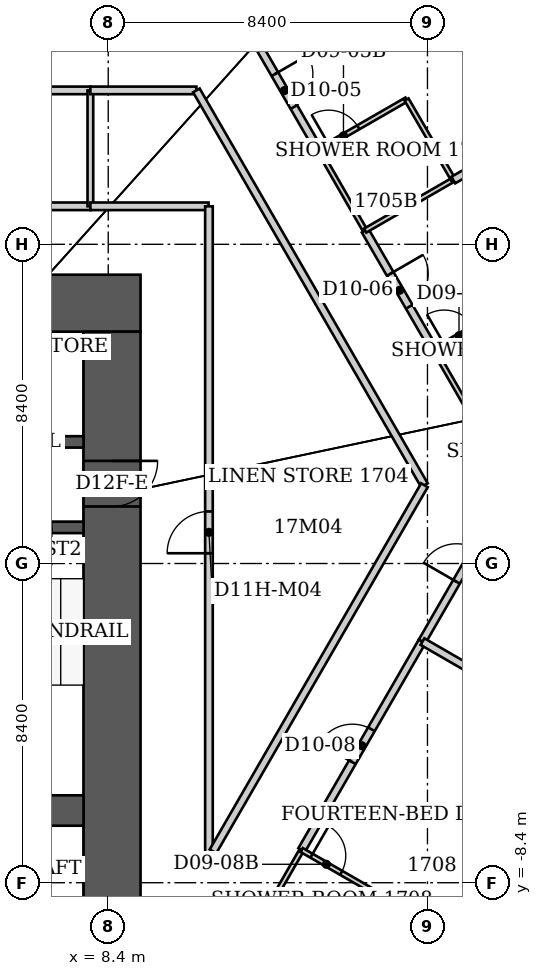
"""IFC4 building model, lengths in metres.
Left out: names, types, materials, properties, quantities, classifications, styles, units other than length and angle.
Written with IfcOpenShell. Run it as: python <this file> out.ifc"""

import sys

from ifc_helpers import new_model, si_unit, direction, frame, frame_2d, origin, place, context, subcontext, project, spatial, rectangle, extrude, element, fill, save


model = new_model("IFC4")
c1 = context("Model", 3, precision=1e-05, world=origin(), true_north=direction((0.0, 1.0)))
c2 = subcontext(c1, "Body", "Model", "MODEL_VIEW")
j1 = project(units=[si_unit("LENGTHUNIT", "METRE"), si_unit("PLANEANGLEUNIT", "RADIAN")], contexts=[c1])
p1 = place(None, origin())
s1 = spatial("IfcSite", under=j1, at=p1, CompositionType="ELEMENT")
p2 = place(p1, origin())
s2 = spatial("IfcBuilding", under=s1, at=p2, CompositionType="ELEMENT")
p3 = place(p2, frame((0.0, 0.0, 72.4)))
s3 = spatial("IfcBuildingStorey", under=s2, at=p3, CompositionType="ELEMENT", Elevation=72.4)
p4 = place(p3, frame((-9.25, 6.85, 0.0), z_axis=(0.0, 0.0, 1.0), x_axis=(1.0, 0.0, 0.0)))
e1 = element("IfcWall", 1, at=p4, inside=s3, PredefinedType="SHEAR", context=c2, shape_type="SweptSolid", body=[
    extrude(rectangle(XDim=18.5, YDim=1.5, at=frame_2d((9.25, 0.0))), origin(), (0.0, 0.0, 1.0), 3.8),
])
p5 = place(p3, frame((8.5, -9.2, 0.0), z_axis=(0.0, 0.0, 1.0), x_axis=(0.0, 1.0, 0.0)))
e2 = element("IfcWall", 2, at=p5, inside=s3, PredefinedType="SHEAR", context=c2, shape_type="SweptSolid", body=[
    extrude(rectangle(XDim=15.3, YDim=1.5, at=frame_2d((7.65, 0.0))), origin(), (0.0, 0.0, 1.0), 3.8),
])
p6 = place(p5, frame((10.7, 0.0, 0.0)))
e3 = element("IfcOpeningElement", 3, at=p6, cuts=e2, PredefinedType="OPENING", context=c2, shape_type="SweptSolid", body=[
    extrude(rectangle(XDim=1.2, YDim=2.2, at=frame_2d((0.6, 1.1))), frame((0.0, 0.75, 0.0), z_axis=(0.0, -1.0, 0.0), x_axis=(1.0, 0.0, 0.0)), (0.0, 0.0, 1.0), 1.5),
])
p7 = place(p3, frame((-7.75, -6.5, 0.0), z_axis=(0.0, 0.0, 1.0), x_axis=(1.0, 0.0, 0.0)))
e4 = element("IfcWall", 4, at=p7, inside=s3, PredefinedType="SHEAR", context=c2, shape_type="SweptSolid", body=[
    extrude(rectangle(XDim=15.5, YDim=0.8, at=frame_2d((7.75, 0.0))), origin(), (0.0, 0.0, 1.0), 3.8),
])
p8 = place(p3, frame((4.75, 0.95, 0.0), z_axis=(0.0, 0.0, 1.0), x_axis=(1.0, 0.0, 0.0)))
e5 = element("IfcWall", 5, at=p8, inside=s3, PredefinedType="SHEAR", context=c2, shape_type="SweptSolid", body=[
    extrude(rectangle(XDim=3.0, YDim=0.3, at=frame_2d((1.5, 0.0))), origin(), (0.0, 0.0, 1.0), 3.8),
])
p9 = place(p8, frame((1.15, 0.0, 0.0)))
e6 = element("IfcOpeningElement", 6, at=p9, cuts=e5, PredefinedType="OPENING", context=c2, shape_type="SweptSolid", body=[
    extrude(rectangle(XDim=1.0, YDim=2.2, at=frame_2d((0.5, 1.1))), frame((0.0, 0.15, 0.0), z_axis=(0.0, -1.0, 0.0), x_axis=(1.0, 0.0, 0.0)), (0.0, 0.0, 1.0), 0.3),
])
p10 = place(p3, frame((-7.75, 3.2, 0.0), z_axis=(0.0, 0.0, 1.0), x_axis=(1.0, 0.0, 0.0)))
e7 = element("IfcWall", 7, at=p10, inside=s3, PredefinedType="SHEAR", context=c2, shape_type="SweptSolid", body=[
    extrude(rectangle(XDim=15.5, YDim=0.3, at=frame_2d((7.75, 0.0))), origin(), (0.0, 0.0, 1.0), 3.8),
])
p11 = place(p10, frame((5.887, 0.0, 0.0)))
e8 = element("IfcOpeningElement", 8, at=p11, cuts=e7, PredefinedType="OPENING", context=c2, shape_type="SweptSolid", body=[
    extrude(rectangle(XDim=1.1, YDim=2.2, at=frame_2d((0.55, 1.1))), frame((0.0, 0.15, 0.0), z_axis=(0.0, -1.0, 0.0), x_axis=(1.0, 0.0, 0.0)), (0.0, 0.0, 1.0), 0.3),
])
p12 = place(p10, frame((9.194, 0.0, 0.0)))
e9 = element("IfcOpeningElement", 9, at=p12, cuts=e7, PredefinedType="OPENING", context=c2, shape_type="SweptSolid", body=[
    extrude(rectangle(XDim=1.1, YDim=2.2, at=frame_2d((0.55, 1.1))), frame((0.0, 0.15, 0.0), z_axis=(0.0, -1.0, 0.0), x_axis=(1.0, 0.0, 0.0)), (0.0, 0.0, 1.0), 0.3),
])
p13 = place(p10, frame((13.081, 0.0, 0.0)))
e10 = element("IfcOpeningElement", 10, at=p13, cuts=e7, PredefinedType="OPENING", context=c2, shape_type="SweptSolid", body=[
    extrude(rectangle(XDim=1.1, YDim=2.2, at=frame_2d((0.55, 1.1))), frame((0.0, 0.15, 0.0), z_axis=(0.0, -1.0, 0.0), x_axis=(1.0, 0.0, 0.0)), (0.0, 0.0, 1.0), 0.3),
])
p14 = place(p3, frame((-0.87, 12.45, 0.0), z_axis=(0.0, 0.0, 1.0), x_axis=(1.0, 0.0, 0.0)))
e11 = element("IfcWall", 11, at=p14, inside=s3, PredefinedType="PARTITIONING", context=c2, shape_type="SweptSolid", body=[
    extrude(rectangle(XDim=8.8, YDim=0.2, at=frame_2d((4.4, 0.0))), origin(), (0.0, 0.0, 1.0), 3.64),
])
p15 = place(p14, frame((3.85, 0.0, 0.0)))
e12 = element("IfcOpeningElement", 12, at=p15, cuts=e11, PredefinedType="OPENING", context=c2, shape_type="SweptSolid", body=[
    extrude(rectangle(XDim=1.1, YDim=2.2, at=frame_2d((0.55, 1.1))), frame((0.0, 0.1, 0.0), z_axis=(0.0, -1.0, 0.0), x_axis=(1.0, 0.0, 0.0)), (0.0, 0.0, 1.0), 0.2),
])
p16 = place(p3, frame((7.93, 9.4, 0.0), z_axis=(0.0, 0.0, 1.0), x_axis=(-1.0, 0.0, 0.0)))
e13 = element("IfcWall", 13, at=p16, inside=s3, PredefinedType="PARTITIONING", context=c2, shape_type="SweptSolid", body=[
    extrude(rectangle(XDim=8.8, YDim=0.2, at=frame_2d((4.4, 0.0))), origin(), (0.0, 0.0, 1.0), 3.64),
])
p17 = place(p3, frame((7.93, 12.45, 0.0), z_axis=(0.0, 0.0, 1.0), x_axis=(0.0, -1.0, 0.0)))
e14 = element("IfcWall", 14, at=p17, inside=s3, PredefinedType="PARTITIONING", context=c2, shape_type="SweptSolid", body=[
    extrude(rectangle(XDim=3.05, YDim=0.15, at=frame_2d((1.525, 0.0))), origin(), (0.0, 0.0, 1.0), 3.64),
])
p18 = place(p3, frame((7.93, 12.45, 0.0), z_axis=(0.0, 0.0, 1.0), x_axis=(1.0, 0.0, 0.0)))
e15 = element("IfcWall", 15, at=p18, inside=s3, PredefinedType="PARTITIONING", context=c2, shape_type="SweptSolid", body=[
    extrude(rectangle(XDim=2.79, YDim=0.2, at=frame_2d((1.395, 0.0))), origin(), (0.0, 0.0, 1.0), 3.64),
])
p19 = place(p3, frame((10.72, 12.45, 0.0), z_axis=(0.0, 0.0, 1.0), x_axis=(0.500087057827, -0.86597513509, 0.0)))
e16 = element("IfcWall", 16, at=p19, inside=s3, PredefinedType="PARTITIONING", context=c2, shape_type="SweptSolid", body=[
    extrude(rectangle(XDim=11.998, YDim=0.2, at=frame_2d((5.999, 0.0))), origin(), (0.0, 0.0, 1.0), 3.64),
])
p20 = place(p3, frame((11.04, 9.4, 0.0), z_axis=(0.0, 0.0, 1.0), x_axis=(-1.0, 0.0, 0.0)))
e17 = element("IfcWall", 17, at=p20, inside=s3, PredefinedType="PARTITIONING", context=c2, shape_type="SweptSolid", body=[
    extrude(rectangle(XDim=3.11, YDim=0.2, at=frame_2d((1.555, 0.0))), origin(), (0.0, 0.0, 1.0), 3.64),
])
p21 = place(p3, frame((11.05, -7.76, 0.0), z_axis=(0.0, 0.0, 1.0), x_axis=(0.0, 1.0, 0.0)))
e18 = element("IfcWall", 18, at=p21, inside=s3, PredefinedType="PARTITIONING", context=c2, shape_type="SweptSolid", body=[
    extrude(rectangle(XDim=17.16, YDim=0.2, at=frame_2d((8.58, 0.0))), origin(), (0.0, 0.0, 1.0), 3.64),
])
p22 = place(p21, frame((8.03, 0.0, 0.0)))
e19 = element("IfcOpeningElement", 19, at=p22, cuts=e18, PredefinedType="OPENING", context=c2, shape_type="SweptSolid", body=[
    extrude(rectangle(XDim=1.1, YDim=2.2, at=frame_2d((0.55, 1.1))), frame((0.0, 0.1, 0.0), z_axis=(0.0, -1.0, 0.0), x_axis=(1.0, 0.0, 0.0)), (0.0, 0.0, 1.0), 0.2),
])
p23 = place(p3, frame((12.13, 14.01, 0.0), z_axis=(0.0, 0.0, 1.0), x_axis=(0.500597042564, -0.865680426587, 0.0)))
e20 = element("IfcWall", 20, at=p23, inside=s3, PredefinedType="PARTITIONING", context=c2, shape_type="SweptSolid", body=[
    extrude(rectangle(XDim=3.616, YDim=0.2, at=frame_2d((1.808, 0.0))), origin(), (0.0, 0.0, 1.0), 3.64),
])
p24 = place(p23, frame((1.308, 0.0, 0.0)))
e21 = element("IfcOpeningElement", 21, at=p24, cuts=e20, PredefinedType="OPENING", context=c2, shape_type="SweptSolid", body=[
    extrude(rectangle(XDim=1.0, YDim=2.13, at=frame_2d((0.5, 1.065))), frame((0.0, 0.1, 0.0), z_axis=(0.0, -1.0, 0.0), x_axis=(1.0, 0.0, 0.0)), (0.0, 0.0, 1.0), 0.2),
])
p25 = place(p3, frame((12.29, -9.62, 0.0), z_axis=(0.0, 0.0, 1.0), x_axis=(0.499693115345, 0.866202511239, 0.0)))
e22 = element("IfcWall", 22, at=p25, inside=s3, PredefinedType="PARTITIONING", context=c2, shape_type="SweptSolid", body=[
    extrude(rectangle(XDim=2.401, YDim=0.12, at=frame_2d((1.201, 0.0))), origin(), (0.0, 0.0, 1.0), 3.64),
])
p26 = place(p3, frame((13.49, -7.54, 0.0), z_axis=(0.0, 0.0, 1.0), x_axis=(0.500032479136, 0.866006651134, 0.0)))
e23 = element("IfcWall", 23, at=p26, inside=s3, PredefinedType="PARTITIONING", context=c2, shape_type="SweptSolid", body=[
    extrude(rectangle(XDim=6.339, YDim=0.2, at=frame_2d((3.17, 0.0))), origin(), (0.0, 0.0, 1.0), 3.64),
])
p27 = place(p26, frame((2.67, 0.0, 0.0)))
e24 = element("IfcOpeningElement", 24, at=p27, cuts=e23, PredefinedType="OPENING", context=c2, shape_type="SweptSolid", body=[
    extrude(rectangle(XDim=1.0, YDim=2.13, at=frame_2d((0.5, 1.065))), frame((0.0, 0.1, 0.0), z_axis=(0.0, -1.0, 0.0), x_axis=(1.0, 0.0, 0.0)), (0.0, 0.0, 1.0), 0.2),
])
p28 = place(p3, frame((13.94, 10.88, 0.0), z_axis=(0.0, 0.0, 1.0), x_axis=(0.498791783817, -0.866721844883, 0.0)))
e25 = element("IfcWall", 25, at=p28, inside=s3, PredefinedType="PARTITIONING", context=c2, shape_type="SweptSolid", body=[
    extrude(rectangle(XDim=2.446, YDim=0.12, at=frame_2d((1.223, 0.0))), origin(), (0.0, 0.0, 1.0), 3.64),
])
p29 = place(p3, frame((15.16, 8.76, 0.0), z_axis=(0.0, 0.0, 1.0), x_axis=(0.500948763063, -0.865476941799, 0.0)))
e26 = element("IfcWall", 26, at=p29, inside=s3, PredefinedType="PARTITIONING", context=c2, shape_type="SweptSolid", body=[
    extrude(rectangle(XDim=3.629, YDim=0.2, at=frame_2d((1.815, 0.0))), origin(), (0.0, 0.0, 1.0), 3.64),
])
p30 = place(p29, frame((1.315, 0.0, 0.0)))
e27 = element("IfcOpeningElement", 27, at=p30, cuts=e26, PredefinedType="OPENING", context=c2, shape_type="SweptSolid", body=[
    extrude(rectangle(XDim=1.0, YDim=2.13, at=frame_2d((0.5, 1.065))), frame((0.0, 0.1, 0.0), z_axis=(0.0, -1.0, 0.0), x_axis=(1.0, 0.0, 0.0)), (0.0, 0.0, 1.0), 0.2),
])
p31 = place(p3, frame((15.16, 8.76, 0.0), z_axis=(0.0, 0.0, 1.0), x_axis=(0.865929097586, 0.500166770141, 0.0)))
e28 = element("IfcWall", 28, at=p31, inside=s3, PredefinedType="PARTITIONING", context=c2, shape_type="SweptSolid", body=[
    extrude(rectangle(XDim=2.679, YDim=0.12, at=frame_2d((1.34, 0.0))), origin(), (0.0, 0.0, 1.0), 2.86),
])
p32 = place(p3, frame((15.76, -8.85, 0.0), z_axis=(0.0, 0.0, 1.0), x_axis=(-0.866114241029, 0.499846097802, 0.0)))
e29 = element("IfcWall", 29, at=p32, inside=s3, PredefinedType="PARTITIONING", context=c2, shape_type="SweptSolid", body=[
    extrude(rectangle(XDim=2.621, YDim=0.12, at=frame_2d((1.311, 0.0))), origin(), (0.0, 0.0, 1.0), 3.64),
])
p33 = place(p32, frame((1.421, 0.0, 0.0)))
e30 = element("IfcOpeningElement", 30, at=p33, cuts=e29, PredefinedType="OPENING", context=c2, shape_type="SweptSolid", body=[
    extrude(rectangle(XDim=0.9, YDim=2.03, at=frame_2d((0.45, 1.015))), frame((0.0, 0.06, 0.0), z_axis=(0.0, -1.0, 0.0), x_axis=(1.0, 0.0, 0.0)), (0.0, 0.0, 1.0), 0.12),
])
p34 = place(p3, frame((16.25, 12.21, 0.0), z_axis=(0.0, 0.0, 1.0), x_axis=(-0.866654860089, -0.498908161372, 0.0)))
e31 = element("IfcWall", 31, at=p34, inside=s3, PredefinedType="PARTITIONING", context=c2, shape_type="SweptSolid", body=[
    extrude(rectangle(XDim=2.666, YDim=0.12, at=frame_2d((1.333, 0.0))), origin(), (0.0, 0.0, 1.0), 3.64),
])
p35 = place(p34, frame((1.466, 0.0, 0.0)))
e32 = element("IfcOpeningElement", 32, at=p35, cuts=e31, PredefinedType="OPENING", context=c2, shape_type="SweptSolid", body=[
    extrude(rectangle(XDim=0.9, YDim=2.03, at=frame_2d((0.45, 1.015))), frame((0.0, 0.06, 0.0), z_axis=(0.0, -1.0, 0.0), x_axis=(1.0, 0.0, 0.0)), (0.0, 0.0, 1.0), 0.12),
])
p36 = place(p3, frame((16.66, -2.05, 0.0), z_axis=(0.0, 0.0, 1.0), x_axis=(0.499535055988, 0.866293672977, 0.0)))
e33 = element("IfcWall", 33, at=p36, inside=s3, PredefinedType="PARTITIONING", context=c2, shape_type="SweptSolid", body=[
    extrude(rectangle(XDim=4.625, YDim=0.2, at=frame_2d((2.312, 0.0))), origin(), (0.0, 0.0, 1.0), 3.64),
])
p37 = place(p36, frame((1.812, 0.0, 0.0)))
e34 = element("IfcOpeningElement", 34, at=p37, cuts=e33, PredefinedType="OPENING", context=c2, shape_type="SweptSolid", body=[
    extrude(rectangle(XDim=1.0, YDim=2.13, at=frame_2d((0.5, 1.065))), frame((0.0, 0.1, 0.0), z_axis=(0.0, -1.0, 0.0), x_axis=(1.0, 0.0, 0.0)), (0.0, 0.0, 1.0), 0.2),
])
p38 = place(p3, frame((16.72, 2.06, 0.0), z_axis=(0.0, 0.0, 1.0), x_axis=(-0.500028942393, -0.866008693241, 0.0)))
e35 = element("IfcWall", 35, at=p38, inside=s3, PredefinedType="PARTITIONING", context=c2, shape_type="SweptSolid", body=[
    extrude(rectangle(XDim=11.124, YDim=0.2, at=frame_2d((5.562, 0.0))), origin(), (0.0, 0.0, 1.0), 3.64),
])
p39 = place(p3, frame((16.978, 5.619, 0.0), z_axis=(0.0, 0.0, 1.0), x_axis=(0.499489120551, -0.866320159324, 0.0)))
e36 = element("IfcWall", 36, at=p39, inside=s3, PredefinedType="PARTITIONING", context=c2, shape_type="SweptSolid", body=[
    extrude(rectangle(XDim=2.446, YDim=0.12, at=frame_2d((1.223, 0.0))), origin(), (0.0, 0.0, 1.0), 3.64),
])
p40 = place(p3, frame((17.48, 10.1, 0.0), z_axis=(0.0, 0.0, 1.0), x_axis=(-0.503634814725, 0.863916647251, 0.0)))
e37 = element("IfcWall", 37, at=p40, inside=s3, PredefinedType="PARTITIONING", context=c2, shape_type="SweptSolid", body=[
    extrude(rectangle(XDim=2.442, YDim=0.12, at=frame_2d((1.221, 0.0))), origin(), (0.0, 0.0, 1.0), 3.64),
])
p41 = place(p3, frame((19.29, 6.95, 0.0), z_axis=(0.0, 0.0, 1.0), x_axis=(-0.866654860089, -0.498908161372, 0.0)))
e38 = element("IfcWall", 38, at=p41, inside=s3, PredefinedType="PARTITIONING", context=c2, shape_type="SweptSolid", body=[
    extrude(rectangle(XDim=2.666, YDim=0.12, at=frame_2d((1.333, 0.0))), origin(), (0.0, 0.0, 1.0), 3.64),
])
p42 = place(p41, frame((1.466, 0.0, 0.0)))
e39 = element("IfcOpeningElement", 39, at=p42, cuts=e38, PredefinedType="OPENING", context=c2, shape_type="SweptSolid", body=[
    extrude(rectangle(XDim=0.9, YDim=2.03, at=frame_2d((0.45, 1.015))), frame((0.0, 0.06, 0.0), z_axis=(0.0, -1.0, 0.0), x_axis=(1.0, 0.0, 0.0)), (0.0, 0.0, 1.0), 0.12),
])
p43 = place(p3, frame((23.916, -6.24, 0.0), z_axis=(0.0, 0.0, 1.0), x_axis=(-0.865982991691, 0.500073452706, 0.0)))
e40 = element("IfcWall", 40, at=p43, inside=s3, PredefinedType="PARTITIONING", context=c2, shape_type="SweptSolid", body=[
    extrude(rectangle(XDim=8.369, YDim=0.2, at=frame_2d((4.185, 0.0))), origin(), (0.0, 0.0, 1.0), 3.64),
])
p44 = place(p3, frame((25.886, 14.95, 0.0), z_axis=(0.0, 0.0, 1.0), x_axis=(-0.865734831114, -0.500502949238, 0.0)))
e41 = element("IfcWall", 41, at=p44, inside=s3, PredefinedType="PARTITIONING", context=c2, shape_type="SweptSolid", body=[
    extrude(rectangle(XDim=9.71, YDim=0.2, at=frame_2d((4.855, 0.0))), origin(), (0.0, 0.0, 1.0), 2.86),
])
p45 = place(p24, origin())
e42 = element("IfcDoor", 42, at=p45, inside=s3, OperationType="SINGLE_SWING_LEFT", PredefinedType="DOOR", context=c2, shape_type="SweptSolid", body=[
    extrude(rectangle(XDim=1.0, YDim=2.13, at=frame_2d((0.5, 1.065))), frame((0.0, 0.025, 0.0), z_axis=(0.0, -1.0, 0.0), x_axis=(1.0, 0.0, 0.0)), (0.0, 0.0, 1.0), 0.05),
])
fill(e21, e42)
p46 = place(p35, origin())
e43 = element("IfcDoor", 43, at=p46, inside=s3, OperationType="SINGLE_SWING_RIGHT", PredefinedType="DOOR", context=c2, shape_type="SweptSolid", body=[
    extrude(rectangle(XDim=0.9, YDim=2.03, at=frame_2d((0.45, 1.015))), frame((0.0, 0.025, 0.0), z_axis=(0.0, -1.0, 0.0), x_axis=(1.0, 0.0, 0.0)), (0.0, 0.0, 1.0), 0.05),
])
fill(e32, e43)
p47 = place(p30, origin())
e44 = element("IfcDoor", 44, at=p47, inside=s3, OperationType="SINGLE_SWING_LEFT", PredefinedType="DOOR", context=c2, shape_type="SweptSolid", body=[
    extrude(rectangle(XDim=1.0, YDim=2.13, at=frame_2d((0.5, 1.065))), frame((0.0, 0.025, 0.0), z_axis=(0.0, -1.0, 0.0), x_axis=(1.0, 0.0, 0.0)), (0.0, 0.0, 1.0), 0.05),
])
fill(e27, e44)
p48 = place(p42, origin())
e45 = element("IfcDoor", 45, at=p48, inside=s3, OperationType="SINGLE_SWING_RIGHT", PredefinedType="DOOR", context=c2, shape_type="SweptSolid", body=[
    extrude(rectangle(XDim=0.9, YDim=2.03, at=frame_2d((0.45, 1.015))), frame((0.0, 0.025, 0.0), z_axis=(0.0, -1.0, 0.0), x_axis=(1.0, 0.0, 0.0)), (0.0, 0.0, 1.0), 0.05),
])
fill(e39, e45)
p49 = place(p37, origin())
e46 = element("IfcDoor", 46, at=p49, inside=s3, OperationType="SINGLE_SWING_LEFT", PredefinedType="DOOR", context=c2, shape_type="SweptSolid", body=[
    extrude(rectangle(XDim=1.0, YDim=2.13, at=frame_2d((0.5, 1.065))), frame((0.0, 0.025, 0.0), z_axis=(0.0, -1.0, 0.0), x_axis=(1.0, 0.0, 0.0)), (0.0, 0.0, 1.0), 0.05),
])
fill(e34, e46)
p50 = place(p27, origin())
e47 = element("IfcDoor", 47, at=p50, inside=s3, OperationType="SINGLE_SWING_LEFT", PredefinedType="DOOR", context=c2, shape_type="SweptSolid", body=[
    extrude(rectangle(XDim=1.0, YDim=2.13, at=frame_2d((0.5, 1.065))), frame((0.0, 0.025, 0.0), z_axis=(0.0, -1.0, 0.0), x_axis=(1.0, 0.0, 0.0)), (0.0, 0.0, 1.0), 0.05),
])
fill(e24, e47)
p51 = place(p33, origin())
e48 = element("IfcDoor", 48, at=p51, inside=s3, OperationType="SINGLE_SWING_RIGHT", PredefinedType="DOOR", context=c2, shape_type="SweptSolid", body=[
    extrude(rectangle(XDim=0.9, YDim=2.03, at=frame_2d((0.45, 1.015))), frame((0.0, 0.025, 0.0), z_axis=(0.0, -1.0, 0.0), x_axis=(1.0, 0.0, 0.0)), (0.0, 0.0, 1.0), 0.05),
])
fill(e30, e48)
p52 = place(p22, origin())
e49 = element("IfcDoor", 49, at=p52, inside=s3, OperationType="SINGLE_SWING_LEFT", PredefinedType="DOOR", context=c2, shape_type="SweptSolid", body=[
    extrude(rectangle(XDim=1.1, YDim=2.2, at=frame_2d((0.55, 1.1))), frame((0.0, 0.025, 0.0), z_axis=(0.0, -1.0, 0.0), x_axis=(1.0, 0.0, 0.0)), (0.0, 0.0, 1.0), 0.05),
])
fill(e19, e49)
p53 = place(p6, origin())
e50 = element("IfcDoor", 50, at=p53, inside=s3, OperationType="SINGLE_SWING_RIGHT", PredefinedType="DOOR", context=c2, shape_type="SweptSolid", body=[
    extrude(rectangle(XDim=1.2, YDim=2.2, at=frame_2d((0.6, 1.1))), frame((0.0, 0.025, 0.0), z_axis=(0.0, -1.0, 0.0), x_axis=(1.0, 0.0, 0.0)), (0.0, 0.0, 1.0), 0.05),
])
fill(e3, e50)
save(model, sys.argv[1])
